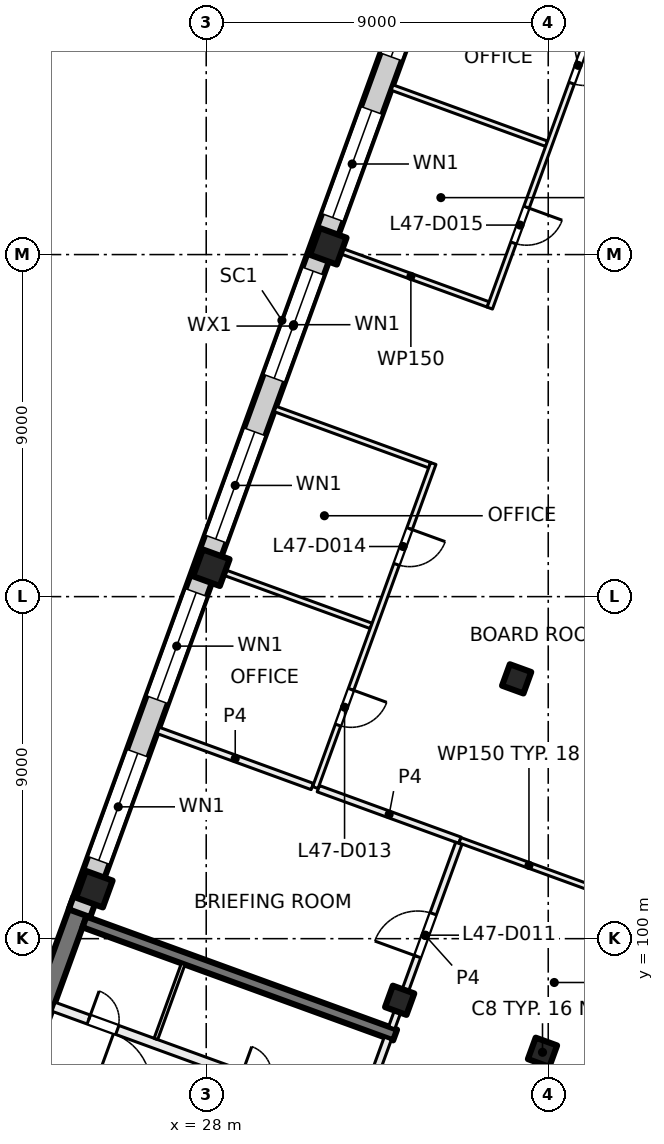
"""IFC4 building model, lengths in metres.
Left out: names, types, materials, properties, quantities, classifications, styles, units other than length and angle.
Written with IfcOpenShell. Run it as: python <this file> out.ifc"""

import sys

from ifc_helpers import new_model, si_unit, direction, frame, frame_2d, origin, origin_2d, place, context, subcontext, project, spatial, rectangle, extrude, element, fill, save


model = new_model("IFC4")
c1 = context("Model", 3, precision=1e-05, world=origin(), true_north=direction((0.0, 1.0)))
c2 = subcontext(c1, "Body", "Model", "MODEL_VIEW")
j1 = project(units=[si_unit("LENGTHUNIT", "METRE"), si_unit("PLANEANGLEUNIT", "RADIAN")], contexts=[c1])
p1 = place(None, origin())
s1 = spatial("IfcSite", under=j1, at=p1, CompositionType="ELEMENT")
p2 = place(p1, origin())
s2 = spatial("IfcBuilding", under=s1, at=p2, CompositionType="ELEMENT")
p3 = place(p2, frame((0.0, 0.0, 200.0)))
s3 = spatial("IfcBuildingStorey", under=s2, at=p3, CompositionType="ELEMENT", Elevation=200.0)
for number, where, z_axis, x_axis in (
    (1, (36.849, 97.011, 0.0), (0.0, 0.0, 1.0), (-0.342, -0.94, 0.0)),
    (2, (36.169, 106.836, 0.0), (0.0, 0.0, 1.0), (-0.342, -0.94, 0.0)),
    (3, (33.091, 98.379, 0.0), (0.0, 0.0, 1.0), (-0.342, -0.94, 0.0)),
):
    element("IfcColumn", number, at=place(p3, frame(where, z_axis=z_axis, x_axis=x_axis)), inside=s3, PredefinedType="COLUMN", context=c2, shape_type="SweptSolid", body=[
        extrude(rectangle(XDim=0.6, YDim=0.6, at=origin_2d()), origin(), (0.0, 0.0, 1.0), 4.0),
    ])
for number, where, z_axis, x_axis in (
    (4, (31.212, 118.218, 0.0), (0.0, 0.0, 1.0), (-0.342, -0.94, 0.0)),
    (5, (28.134, 109.76, 0.0), (0.0, 0.0, 1.0), (-0.342, -0.94, 0.0)),
    (6, (25.056, 101.303, 0.0), (0.0, 0.0, 1.0), (-0.342, -0.94, 0.0)),
):
    element("IfcColumn", number, at=place(p3, frame(where, z_axis=z_axis, x_axis=x_axis)), inside=s3, PredefinedType="COLUMN", context=c2, shape_type="SweptSolid", body=[
        extrude(rectangle(XDim=0.75, YDim=0.75, at=origin_2d()), origin(), (0.0, 0.0, 1.0), 4.0),
    ])
p4 = place(p3, frame((21.67, 92.585, 0.0), z_axis=(0.0, 0.0, 1.0), x_axis=(0.342035714298, 0.93968695327, 0.0)))
e7 = element("IfcWall", 7, at=p4, inside=s3, PredefinedType="SHEAR", context=c2, shape_type="SweptSolid", body=[
    extrude(rectangle(XDim=8.975, YDim=0.5, at=frame_2d((4.488, 0.0))), origin(), (0.0, 0.0, 1.0), 4.0),
])
p5 = place(p3, frame((32.971, 97.465, 0.0), z_axis=(0.0, 0.0, 1.0), x_axis=(-0.939695066972, 0.34201342241, 0.0)))
e8 = element("IfcWall", 8, at=p5, inside=s3, PredefinedType="SHEAR", context=c2, shape_type="SweptSolid", body=[
    extrude(rectangle(XDim=8.7, YDim=0.3, at=frame_2d((4.35, 0.0))), origin(), (0.0, 0.0, 1.0), 4.0),
])
p6 = place(p3, frame((24.666, 100.669, 0.0), z_axis=(0.0, 0.0, 1.0), x_axis=(0.34201964167, 0.939692803373, 0.0)))
e9 = element("IfcWall", 9, at=p6, inside=s3, PredefinedType="SOLIDWALL", context=c2, shape_type="SweptSolid", body=[
    extrude(rectangle(XDim=32.884, YDim=0.6, at=frame_2d((16.442, 0.0))), origin(), (0.0, 0.0, 1.0), 3.625),
])
p7 = place(p6, frame((1.48, 0.0, 0.9)))
e10 = element("IfcOpeningElement", 10, at=p7, cuts=e9, PredefinedType="OPENING", context=c2, shape_type="SweptSolid", body=[
    extrude(rectangle(XDim=3.0, YDim=2.4, at=frame_2d((1.5, 1.2))), frame((0.0, 0.31, 0.0), z_axis=(0.0, -1.0, 0.0), x_axis=(1.0, 0.0, 0.0)), (0.0, 0.0, 1.0), 0.62),
])
p8 = place(p6, frame((5.98, 0.0, 0.9)))
e11 = element("IfcOpeningElement", 11, at=p8, cuts=e9, PredefinedType="OPENING", context=c2, shape_type="SweptSolid", body=[
    extrude(rectangle(XDim=3.0, YDim=2.4, at=frame_2d((1.5, 1.2))), frame((0.0, 0.31, 0.0), z_axis=(0.0, -1.0, 0.0), x_axis=(1.0, 0.0, 0.0)), (0.0, 0.0, 1.0), 0.62),
])
p9 = place(p6, frame((10.48, 0.0, 0.9)))
e12 = element("IfcOpeningElement", 12, at=p9, cuts=e9, PredefinedType="OPENING", context=c2, shape_type="SweptSolid", body=[
    extrude(rectangle(XDim=3.0, YDim=2.4, at=frame_2d((1.5, 1.2))), frame((0.0, 0.31, 0.0), z_axis=(0.0, -1.0, 0.0), x_axis=(1.0, 0.0, 0.0)), (0.0, 0.0, 1.0), 0.62),
])
p10 = place(p6, frame((14.98, 0.0, 0.9)))
e13 = element("IfcOpeningElement", 13, at=p10, cuts=e9, PredefinedType="OPENING", context=c2, shape_type="SweptSolid", body=[
    extrude(rectangle(XDim=3.0, YDim=2.4, at=frame_2d((1.5, 1.2))), frame((0.0, 0.31, 0.0), z_axis=(0.0, -1.0, 0.0), x_axis=(1.0, 0.0, 0.0)), (0.0, 0.0, 1.0), 0.62),
])
p11 = place(p6, frame((19.48, 0.0, 0.9)))
e14 = element("IfcOpeningElement", 14, at=p11, cuts=e9, PredefinedType="OPENING", context=c2, shape_type="SweptSolid", body=[
    extrude(rectangle(XDim=3.0, YDim=2.4, at=frame_2d((1.5, 1.2))), frame((0.0, 0.31, 0.0), z_axis=(0.0, -1.0, 0.0), x_axis=(1.0, 0.0, 0.0)), (0.0, 0.0, 1.0), 0.62),
])
p12 = place(p6, frame((23.98, 0.0, 0.9)))
e15 = element("IfcOpeningElement", 15, at=p12, cuts=e9, PredefinedType="OPENING", context=c2, shape_type="SweptSolid", body=[
    extrude(rectangle(XDim=3.0, YDim=2.4, at=frame_2d((1.5, 1.2))), frame((0.0, 0.31, 0.0), z_axis=(0.0, -1.0, 0.0), x_axis=(1.0, 0.0, 0.0)), (0.0, 0.0, 1.0), 0.62),
])
p13 = place(p6, frame((28.48, 0.0, 0.9)))
e16 = element("IfcOpeningElement", 16, at=p13, cuts=e9, PredefinedType="OPENING", context=c2, shape_type="SweptSolid", body=[
    extrude(rectangle(XDim=3.0, YDim=2.4, at=frame_2d((1.5, 1.2))), frame((0.0, 0.31, 0.0), z_axis=(0.0, -1.0, 0.0), x_axis=(1.0, 0.0, 0.0)), (0.0, 0.0, 1.0), 0.62),
])
p14 = place(p3, frame((31.427, 93.663, 0.0), z_axis=(0.0, 0.0, 1.0), x_axis=(0.342030870568, 0.93968871632, 0.0)))
e17 = element("IfcWall", 17, at=p14, inside=s3, PredefinedType="PARTITIONING", context=c2, shape_type="SweptSolid", body=[
    extrude(rectangle(XDim=3.95, YDim=0.2, at=frame_2d((1.975, 0.0))), origin(), (0.0, 0.0, 1.0), 3.625),
])
p15 = place(p14, frame((0.3, 0.0, 0.0)))
e18 = element("IfcOpeningElement", 18, at=p15, cuts=e17, PredefinedType="OPENING", context=c2, shape_type="SweptSolid", body=[
    extrude(rectangle(XDim=1.2, YDim=2.1, at=frame_2d((0.6, 1.05))), frame((0.0, 0.11, 0.0), z_axis=(0.0, -1.0, 0.0), x_axis=(1.0, 0.0, 0.0)), (0.0, 0.0, 1.0), 0.22),
])
p16 = place(p3, frame((23.427, 96.682, 0.0), z_axis=(0.0, 0.0, 1.0), x_axis=(0.939690465531, -0.342026064782, 0.0)))
e19 = element("IfcWall", 19, at=p16, inside=s3, PredefinedType="PARTITIONING", context=c2, shape_type="SweptSolid", body=[
    extrude(rectangle(XDim=8.45, YDim=0.2, at=frame_2d((4.225, 0.0))), origin(), (0.0, 0.0, 1.0), 3.625),
])
p17 = place(p16, frame((1.725, 0.0, 0.0)))
e20 = element("IfcOpeningElement", 20, at=p17, cuts=e19, PredefinedType="OPENING", context=c2, shape_type="SweptSolid", body=[
    extrude(rectangle(XDim=1.5, YDim=2.1, at=frame_2d((0.75, 1.05))), frame((0.0, 0.11, 0.0), z_axis=(0.0, -1.0, 0.0), x_axis=(1.0, 0.0, 0.0)), (0.0, 0.0, 1.0), 0.22),
])
p18 = place(p3, frame((23.983, 98.208, 0.0), z_axis=(0.0, 0.0, 1.0), x_axis=(0.939699751196, -0.342000552051, 0.0)))
e21 = element("IfcWall", 21, at=p18, inside=s3, PredefinedType="PARTITIONING", context=c2, shape_type="SweptSolid", body=[
    extrude(rectangle(XDim=8.45, YDim=0.25, at=frame_2d((4.225, 0.0))), origin(), (0.0, 0.0, 1.0), 3.625),
])
p19 = place(p18, frame((5.26, 0.0, 0.0)))
e22 = element("IfcOpeningElement", 22, at=p19, cuts=e21, PredefinedType="OPENING", context=c2, shape_type="SweptSolid", body=[
    extrude(rectangle(XDim=0.8, YDim=2.1, at=frame_2d((0.4, 1.05))), frame((0.0, 0.135, 0.0), z_axis=(0.0, -1.0, 0.0), x_axis=(1.0, 0.0, 0.0)), (0.0, 0.0, 1.0), 0.27),
])
p20 = place(p18, frame((0.985, 0.0, 0.0)))
e23 = element("IfcOpeningElement", 23, at=p20, cuts=e21, PredefinedType="OPENING", context=c2, shape_type="SweptSolid", body=[
    extrude(rectangle(XDim=0.8, YDim=2.1, at=frame_2d((0.4, 1.05))), frame((0.0, 0.135, 0.0), z_axis=(0.0, -1.0, 0.0), x_axis=(1.0, 0.0, 0.0)), (0.0, 0.0, 1.0), 0.27),
])
p21 = place(p3, frame((26.676, 97.362, 0.0), z_axis=(0.0, 0.0, 1.0), x_axis=(0.342023078919, 0.939691552312, 0.0)))
e24 = element("IfcWall", 24, at=p21, inside=s3, PredefinedType="PARTITIONING", context=c2, shape_type="SweptSolid", body=[
    extrude(rectangle(XDim=2.1, YDim=0.1, at=frame_2d((1.05, 0.0))), origin(), (0.0, 0.0, 1.0), 3.625),
])
p22 = place(p3, frame((26.736, 105.48, 0.0), z_axis=(0.0, 0.0, 1.0), x_axis=(0.939677739056, -0.342061027776, 0.0)))
e25 = element("IfcWall", 25, at=p22, inside=s3, PredefinedType="PARTITIONING", context=c2, shape_type="SweptSolid", body=[
    extrude(rectangle(XDim=4.315, YDim=0.175, at=frame_2d((2.158, 0.0))), origin(), (0.0, 0.0, 1.0), 3.625),
])
p23 = place(p3, frame((28.275, 109.709, 0.0), z_axis=(0.0, 0.0, 1.0), x_axis=(0.939737385516, -0.341897128188, 0.0)))
e26 = element("IfcWall", 26, at=p23, inside=s3, PredefinedType="PARTITIONING", context=c2, shape_type="SweptSolid", body=[
    extrude(rectangle(XDim=4.326, YDim=0.15, at=frame_2d((2.163, 0.0))), origin(), (0.0, 0.0, 1.0), 3.625),
])
p24 = place(p3, frame((29.814, 113.938, 0.0), z_axis=(0.0, 0.0, 1.0), x_axis=(0.93973078783, -0.341915262023, 0.0)))
e27 = element("IfcWall", 27, at=p24, inside=s3, PredefinedType="PARTITIONING", context=c2, shape_type="SweptSolid", body=[
    extrude(rectangle(XDim=4.326, YDim=0.15, at=frame_2d((2.163, 0.0))), origin(), (0.0, 0.0, 1.0), 3.625),
])
p25 = place(p3, frame((30.95, 103.946, 0.0), z_axis=(0.0, 0.0, 1.0), x_axis=(0.939739492658, -0.341891336449, 0.0)))
e28 = element("IfcWall", 28, at=p25, inside=s3, PredefinedType="PARTITIONING", context=c2, shape_type="SweptSolid", body=[
    extrude(rectangle(XDim=3.966, YDim=0.175, at=frame_2d((1.983, 0.0))), origin(), (0.0, 0.0, 1.0), 3.625),
])
p26 = place(p3, frame((32.892, 122.395, 0.0), z_axis=(0.0, 0.0, 1.0), x_axis=(0.93973078783, -0.341915262023, 0.0)))
e29 = element("IfcWall", 29, at=p26, inside=s3, PredefinedType="PARTITIONING", context=c2, shape_type="SweptSolid", body=[
    extrude(rectangle(XDim=4.326, YDim=0.15, at=frame_2d((2.163, 0.0))), origin(), (0.0, 0.0, 1.0), 3.625),
])
p27 = place(p3, frame((33.975, 112.503, 0.0), z_axis=(0.0, 0.0, 1.0), x_axis=(-0.342067078165, -0.939675536574, 0.0)))
e30 = element("IfcWall", 30, at=p27, inside=s3, PredefinedType="PARTITIONING", context=c2, shape_type="SweptSolid", body=[
    extrude(rectangle(XDim=9.074, YDim=0.15, at=frame_2d((4.537, 0.0))), origin(), (0.0, 0.0, 1.0), 3.625),
])
p28 = place(p27, frame((6.325, 0.0, 0.0)))
e31 = element("IfcOpeningElement", 31, at=p28, cuts=e30, PredefinedType="OPENING", context=c2, shape_type="SweptSolid", body=[
    extrude(rectangle(XDim=1.0, YDim=2.1, at=frame_2d((0.5, 1.05))), frame((0.0, 0.085, 0.0), z_axis=(0.0, -1.0, 0.0), x_axis=(1.0, 0.0, 0.0)), (0.0, 0.0, 1.0), 0.17),
])
p29 = place(p27, frame((1.825, 0.0, 0.0)))
e32 = element("IfcOpeningElement", 32, at=p29, cuts=e30, PredefinedType="OPENING", context=c2, shape_type="SweptSolid", body=[
    extrude(rectangle(XDim=1.0, YDim=2.1, at=frame_2d((0.5, 1.05))), frame((0.0, 0.085, 0.0), z_axis=(0.0, -1.0, 0.0), x_axis=(1.0, 0.0, 0.0)), (0.0, 0.0, 1.0), 0.17),
])
p30 = place(p3, frame((34.431, 126.624, 0.0), z_axis=(0.0, 0.0, 1.0), x_axis=(0.939678226331, -0.342059689177, 0.0)))
e33 = element("IfcWall", 33, at=p30, inside=s3, PredefinedType="PARTITIONING", context=c2, shape_type="SweptSolid", body=[
    extrude(rectangle(XDim=16.901, YDim=0.15, at=frame_2d((8.45, 0.0))), origin(), (0.0, 0.0, 1.0), 3.625),
])
p31 = place(p3, frame((32.881, 97.657, 0.0), z_axis=(0.0, 0.0, 1.0), x_axis=(0.342058204353, 0.939678766832, 0.0)))
e34 = element("IfcWall", 34, at=p31, inside=s3, PredefinedType="PARTITIONING", context=c2, shape_type="SweptSolid", body=[
    extrude(rectangle(XDim=5.163, YDim=0.175, at=frame_2d((2.581, 0.0))), origin(), (0.0, 0.0, 1.0), 3.625),
])
p32 = place(p31, frame((1.991, 0.0, 0.0)))
e35 = element("IfcOpeningElement", 35, at=p32, cuts=e34, PredefinedType="OPENING", context=c2, shape_type="SweptSolid", body=[
    extrude(rectangle(XDim=1.2, YDim=2.1, at=frame_2d((0.6, 1.05))), frame((0.0, 0.097, 0.0), z_axis=(0.0, -1.0, 0.0), x_axis=(1.0, 0.0, 0.0)), (0.0, 0.0, 1.0), 0.195),
])
p33 = place(p3, frame((34.677, 102.59, 0.0), z_axis=(0.0, 0.0, 1.0), x_axis=(0.939688259666, -0.342032125166, 0.0)))
e36 = element("IfcWall", 36, at=p33, inside=s3, PredefinedType="PARTITIONING", context=c2, shape_type="SweptSolid", body=[
    extrude(rectangle(XDim=3.865, YDim=0.15, at=frame_2d((1.933, 0.0))), origin(), (0.0, 0.0, 1.0), 3.625),
])
p34 = place(p3, frame((35.418, 116.688, 0.0), z_axis=(0.0, 0.0, 1.0), x_axis=(-0.939803311208, 0.341715870634, 0.0)))
e37 = element("IfcWall", 37, at=p34, inside=s3, PredefinedType="PARTITIONING", context=c2, shape_type="SweptSolid", body=[
    extrude(rectangle(XDim=4.325, YDim=0.15, at=frame_2d((2.163, 0.0))), origin(), (0.0, 0.0, 1.0), 3.625),
])
p35 = place(p3, frame((38.54, 125.049, 0.0), z_axis=(0.0, 0.0, 1.0), x_axis=(-0.3420218461, -0.939692001025, 0.0)))
e38 = element("IfcWall", 38, at=p35, inside=s3, PredefinedType="PARTITIONING", context=c2, shape_type="SweptSolid", body=[
    extrude(rectangle(XDim=9.0, YDim=0.15, at=frame_2d((4.5, 0.0))), origin(), (0.0, 0.0, 1.0), 3.625),
])
p36 = place(p35, frame((6.175, 0.0, 0.0)))
e39 = element("IfcOpeningElement", 39, at=p36, cuts=e38, PredefinedType="OPENING", context=c2, shape_type="SweptSolid", body=[
    extrude(rectangle(XDim=1.0, YDim=2.1, at=frame_2d((0.5, 1.05))), frame((0.0, 0.085, 0.0), z_axis=(0.0, -1.0, 0.0), x_axis=(1.0, 0.0, 0.0)), (0.0, 0.0, 1.0), 0.17),
])
p37 = place(p35, frame((1.703, 0.0, 0.0)))
e40 = element("IfcOpeningElement", 40, at=p37, cuts=e38, PredefinedType="OPENING", context=c2, shape_type="SweptSolid", body=[
    extrude(rectangle(XDim=1.0, YDim=2.1, at=frame_2d((0.5, 1.05))), frame((0.0, 0.085, 0.0), z_axis=(0.0, -1.0, 0.0), x_axis=(1.0, 0.0, 0.0)), (0.0, 0.0, 1.0), 0.17),
])
p38 = place(p7, origin())
e41 = element("IfcWindow", 41, at=p38, inside=s3, PartitioningType="SINGLE_PANEL", PredefinedType="WINDOW", context=c2, shape_type="SweptSolid", body=[
    extrude(rectangle(XDim=3.0, YDim=2.4, at=frame_2d((1.5, 1.2))), frame((0.0, 0.03, 0.0), z_axis=(0.0, -1.0, 0.0), x_axis=(1.0, 0.0, 0.0)), (0.0, 0.0, 1.0), 0.06),
])
fill(e10, e41)
p39 = place(p8, origin())
e42 = element("IfcWindow", 42, at=p39, inside=s3, PartitioningType="SINGLE_PANEL", PredefinedType="WINDOW", context=c2, shape_type="SweptSolid", body=[
    extrude(rectangle(XDim=3.0, YDim=2.4, at=frame_2d((1.5, 1.2))), frame((0.0, 0.03, 0.0), z_axis=(0.0, -1.0, 0.0), x_axis=(1.0, 0.0, 0.0)), (0.0, 0.0, 1.0), 0.06),
])
fill(e11, e42)
p40 = place(p9, origin())
e43 = element("IfcWindow", 43, at=p40, inside=s3, PartitioningType="SINGLE_PANEL", PredefinedType="WINDOW", context=c2, shape_type="SweptSolid", body=[
    extrude(rectangle(XDim=3.0, YDim=2.4, at=frame_2d((1.5, 1.2))), frame((0.0, 0.03, 0.0), z_axis=(0.0, -1.0, 0.0), x_axis=(1.0, 0.0, 0.0)), (0.0, 0.0, 1.0), 0.06),
])
fill(e12, e43)
p41 = place(p10, origin())
e44 = element("IfcWindow", 44, at=p41, inside=s3, PartitioningType="SINGLE_PANEL", PredefinedType="WINDOW", context=c2, shape_type="SweptSolid", body=[
    extrude(rectangle(XDim=3.0, YDim=2.4, at=frame_2d((1.5, 1.2))), frame((0.0, 0.03, 0.0), z_axis=(0.0, -1.0, 0.0), x_axis=(1.0, 0.0, 0.0)), (0.0, 0.0, 1.0), 0.06),
])
fill(e13, e44)
p42 = place(p11, origin())
e45 = element("IfcWindow", 45, at=p42, inside=s3, PartitioningType="SINGLE_PANEL", PredefinedType="WINDOW", context=c2, shape_type="SweptSolid", body=[
    extrude(rectangle(XDim=3.0, YDim=2.4, at=frame_2d((1.5, 1.2))), frame((0.0, 0.03, 0.0), z_axis=(0.0, -1.0, 0.0), x_axis=(1.0, 0.0, 0.0)), (0.0, 0.0, 1.0), 0.06),
])
fill(e14, e45)
p43 = place(p12, origin())
e46 = element("IfcWindow", 46, at=p43, inside=s3, PartitioningType="SINGLE_PANEL", PredefinedType="WINDOW", context=c2, shape_type="SweptSolid", body=[
    extrude(rectangle(XDim=3.0, YDim=2.4, at=frame_2d((1.5, 1.2))), frame((0.0, 0.03, 0.0), z_axis=(0.0, -1.0, 0.0), x_axis=(1.0, 0.0, 0.0)), (0.0, 0.0, 1.0), 0.06),
])
fill(e15, e46)
p44 = place(p20, origin())
e47 = element("IfcDoor", 47, at=p44, inside=s3, OperationType="SINGLE_SWING_RIGHT", PredefinedType="DOOR", context=c2, shape_type="SweptSolid", body=[
    extrude(rectangle(XDim=0.8, YDim=2.1, at=frame_2d((0.4, 1.05))), frame((0.0, 0.025, 0.0), z_axis=(0.0, -1.0, 0.0), x_axis=(1.0, 0.0, 0.0)), (0.0, 0.0, 1.0), 0.05),
])
fill(e23, e47)
p45 = place(p32, origin())
e48 = element("IfcDoor", 48, at=p45, inside=s3, OperationType="DOUBLE_DOOR_SINGLE_SWING", PredefinedType="DOOR", context=c2, shape_type="SweptSolid", body=[
    extrude(rectangle(XDim=1.2, YDim=2.1, at=frame_2d((0.6, 1.05))), frame((0.0, 0.025, 0.0), z_axis=(0.0, -1.0, 0.0), x_axis=(1.0, 0.0, 0.0)), (0.0, 0.0, 1.0), 0.05),
])
fill(e35, e48)
p46 = place(p28, origin())
e49 = element("IfcDoor", 49, at=p46, inside=s3, OperationType="SINGLE_SWING_LEFT", PredefinedType="DOOR", context=c2, shape_type="SweptSolid", body=[
    extrude(rectangle(XDim=1.0, YDim=2.1, at=frame_2d((0.5, 1.05))), frame((0.0, 0.025, 0.0), z_axis=(0.0, -1.0, 0.0), x_axis=(1.0, 0.0, 0.0)), (0.0, 0.0, 1.0), 0.05),
])
fill(e31, e49)
p47 = place(p29, origin())
e50 = element("IfcDoor", 50, at=p47, inside=s3, OperationType="SINGLE_SWING_LEFT", PredefinedType="DOOR", context=c2, shape_type="SweptSolid", body=[
    extrude(rectangle(XDim=1.0, YDim=2.1, at=frame_2d((0.5, 1.05))), frame((0.0, 0.025, 0.0), z_axis=(0.0, -1.0, 0.0), x_axis=(1.0, 0.0, 0.0)), (0.0, 0.0, 1.0), 0.05),
])
fill(e32, e50)
p48 = place(p36, origin())
e51 = element("IfcDoor", 51, at=p48, inside=s3, OperationType="SINGLE_SWING_RIGHT", PredefinedType="DOOR", context=c2, shape_type="SweptSolid", body=[
    extrude(rectangle(XDim=1.0, YDim=2.1, at=frame_2d((0.5, 1.05))), frame((0.0, 0.025, 0.0), z_axis=(0.0, -1.0, 0.0), x_axis=(1.0, 0.0, 0.0)), (0.0, 0.0, 1.0), 0.05),
])
fill(e39, e51)
p49 = place(p37, origin())
e52 = element("IfcDoor", 52, at=p49, inside=s3, OperationType="SINGLE_SWING_LEFT", PredefinedType="DOOR", context=c2, shape_type="SweptSolid", body=[
    extrude(rectangle(XDim=1.0, YDim=2.1, at=frame_2d((0.5, 1.05))), frame((0.0, 0.025, 0.0), z_axis=(0.0, -1.0, 0.0), x_axis=(1.0, 0.0, 0.0)), (0.0, 0.0, 1.0), 0.05),
])
fill(e40, e52)
save(model, sys.argv[1])
